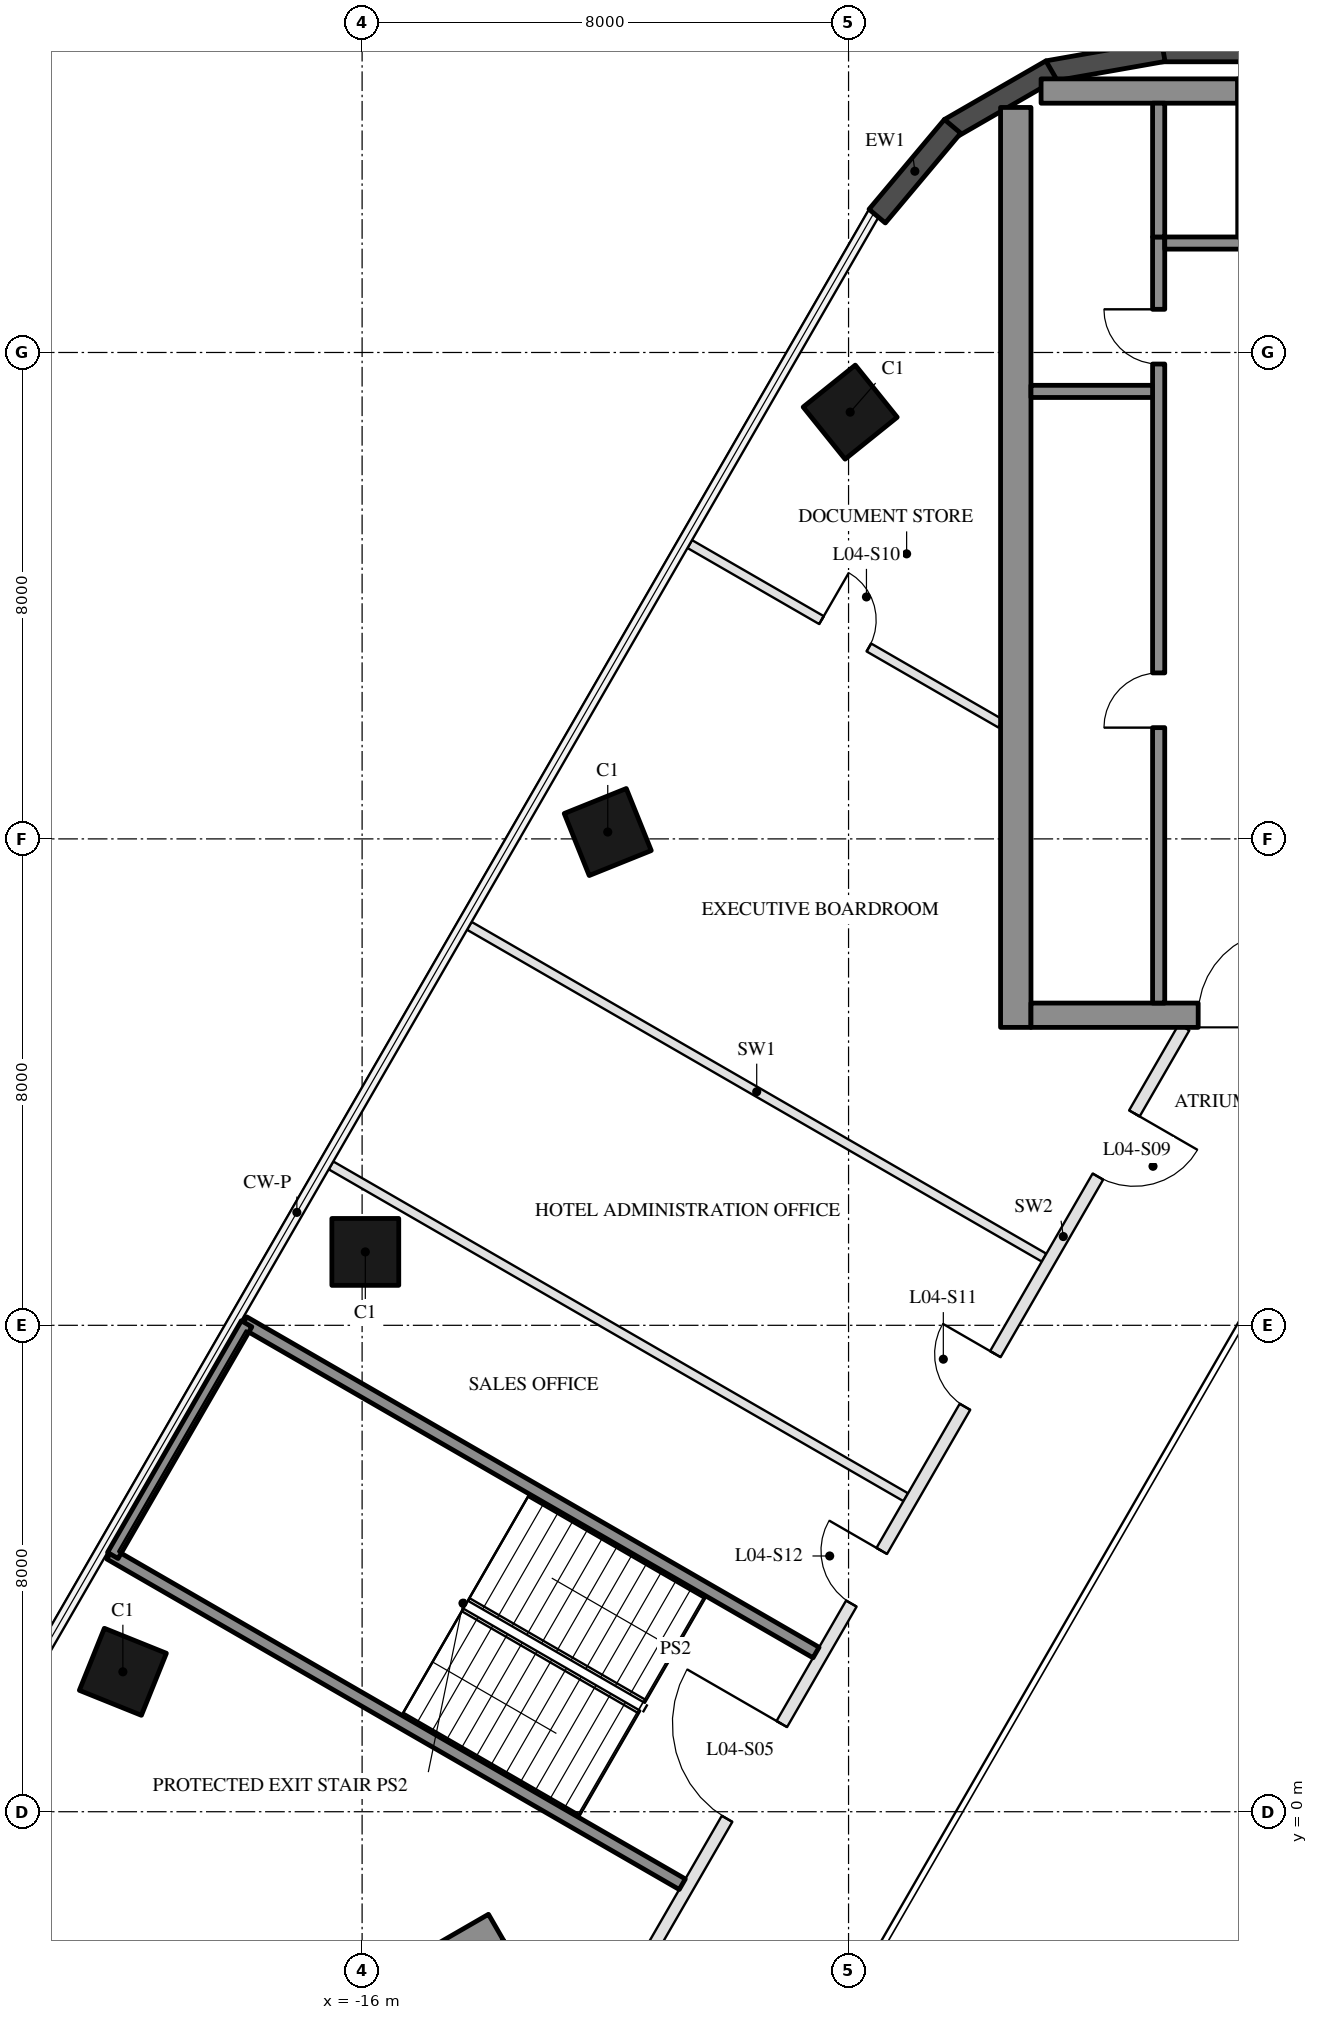
"""IFC4 building model, lengths in metres.
Left out: names, types, materials, properties, quantities, classifications, styles, units other than length and angle.
Written with IfcOpenShell. Run it as: python <this file> out.ifc"""

import sys

from ifc_helpers import new_model, si_unit, direction, frame, frame_2d, origin, origin_2d, place, context, subcontext, project, spatial, rectangle, hollow_rectangle, extrude, boolean, halfspace, element, fill, save


model = new_model("IFC4")
c1 = context("Model", 3, precision=1e-05, world=origin(), true_north=direction((0.0, 1.0)))
c2 = subcontext(c1, "Body", "Model", "MODEL_VIEW")
j1 = project(units=[si_unit("LENGTHUNIT", "METRE"), si_unit("PLANEANGLEUNIT", "RADIAN")], contexts=[c1])
p1 = place(None, origin())
s1 = spatial("IfcSite", under=j1, at=p1, CompositionType="ELEMENT")
p2 = place(p1, origin())
s2 = spatial("IfcBuilding", under=s1, at=p2, CompositionType="ELEMENT")
p3 = place(p2, frame((0.0, 0.0, 28.5)))
s3 = spatial("IfcBuildingStorey", under=s2, at=p3, CompositionType="ELEMENT", Elevation=28.5)
p4 = place(p3, frame((-7.973, 23.019, 0.0), z_axis=(0.014257598898, -0.036701119596, 0.999224573704), x_axis=(0.499479314293, 0.865974198785, 0.024679984425)))
e1 = element("IfcColumn", 1, at=p4, inside=s3, PredefinedType="COLUMN", context=c2, shape_type="SweptSolid", body=[
    boolean("DIFFERENCE", boolean("DIFFERENCE", extrude(hollow_rectangle(XDim=1.1, YDim=1.1, WallThickness=0.05, at=origin_2d()), origin(), (0.0, 0.0, 1.0), 4.503), halfspace(frame((0.0, 0.0, 0.013), z_axis=(0.0, 0.0, 1.0), x_axis=(1.0, 0.0, 0.0)), True)), halfspace(frame((0.0, 0.0, 4.491), z_axis=(0.0, 0.0, 1.0), x_axis=(1.0, 0.0, 0.0)), False)),
])
p5 = place(p3, frame((-11.96, 16.113, 0.0), z_axis=(0.020388124423, -0.026081616616, 0.999451886614), x_axis=(0.501064231638, 0.865321827993, 0.012360006954)))
e2 = element("IfcColumn", 2, at=p5, inside=s3, PredefinedType="COLUMN", context=c2, shape_type="SweptSolid", body=[
    boolean("DIFFERENCE", boolean("DIFFERENCE", extrude(hollow_rectangle(XDim=1.1, YDim=1.1, WallThickness=0.05, at=origin_2d()), origin(), (0.0, 0.0, 1.0), 4.502), halfspace(frame((0.0, 0.0, 0.011), z_axis=(0.0, 0.0, 1.0), x_axis=(1.0, 0.0, 0.0)), True)), halfspace(frame((0.0, 0.0, 4.492), z_axis=(0.0, 0.0, 1.0), x_axis=(1.0, 0.0, 0.0)), False)),
])
p6 = place(p3, frame((-15.947, 9.207, 0.0), z_axis=(0.026625850327, -0.015400695505, 0.999526829391), x_axis=(0.500507531384, 0.865732182021, 6.442154e-06)))
e3 = element("IfcColumn", 3, at=p6, inside=s3, PredefinedType="COLUMN", context=c2, shape_type="SweptSolid", body=[
    boolean("DIFFERENCE", boolean("DIFFERENCE", extrude(hollow_rectangle(XDim=1.1, YDim=1.1, WallThickness=0.05, at=origin_2d()), origin(), (0.0, 0.0, 1.0), 4.502), halfspace(frame((0.0, 0.0, 0.01), z_axis=(0.0, 0.0, 1.0), x_axis=(1.0, 0.0, 0.0)), True)), halfspace(frame((0.0, 0.0, 4.492), z_axis=(0.0, 0.0, 1.0), x_axis=(1.0, 0.0, 0.0)), False)),
])
p7 = place(p3, frame((-19.934, 2.301, 0.0), z_axis=(0.032751169552, -0.004609022205, 0.999452909249), x_axis=(-0.499064961058, -0.866476451895, 0.012358112959)))
e4 = element("IfcColumn", 4, at=p7, inside=s3, PredefinedType="COLUMN", context=c2, shape_type="SweptSolid", body=[
    boolean("DIFFERENCE", boolean("DIFFERENCE", extrude(hollow_rectangle(XDim=1.1, YDim=1.1, WallThickness=0.05, at=origin_2d()), origin(), (0.0, 0.0, 1.0), 4.502), halfspace(frame((0.0, 0.0, 0.011), z_axis=(0.0, 0.0, 1.0), x_axis=(1.0, 0.0, 0.0)), True)), halfspace(frame((0.0, 0.0, 4.492), z_axis=(0.0, 0.0, 1.0), x_axis=(1.0, 0.0, 0.0)), False)),
])
p8 = place(p3, frame((0.0, 27.2, 0.0), z_axis=(0.0, 0.0, 1.0), x_axis=(1.0, 0.0, 0.0)))
e5 = element("IfcColumn", 5, at=p8, inside=s3, PredefinedType="COLUMN", context=c2, shape_type="SweptSolid", body=[
    extrude(hollow_rectangle(XDim=3.2, YDim=2.6, WallThickness=0.08, at=origin_2d()), origin(), (0.0, 0.0, 1.0), 4.5),
])
p9 = place(p3, frame((2.856, 28.956, 0.0), z_axis=(0.0, 0.0, 1.0), x_axis=(-1.0, 0.0, 0.0)))
e6 = element("IfcWall", 6, at=p9, inside=s3, PredefinedType="SOLIDWALL", context=c2, shape_type="SweptSolid", body=[
    extrude(rectangle(XDim=5.711, YDim=0.35, at=frame_2d((2.856, 0.0))), origin(), (0.0, 0.0, 1.0), 4.2),
])
p10 = place(p3, frame((-2.825, 28.958, 0.0), z_axis=(0.0, 0.0, 1.0), x_axis=(-0.98481795522, -0.173590308126, 0.0)))
e7 = element("IfcWall", 7, at=p10, inside=s3, PredefinedType="SOLIDWALL", context=c2, shape_type="SweptSolid", body=[
    extrude(rectangle(XDim=1.928, YDim=0.35, at=frame_2d((0.964, 0.0))), origin(), (0.0, 0.0, 1.0), 4.2),
])
for number, where, z_axis, x_axis in (
    (8, (-4.667, 28.645, 0.0), (0.0, 0.0, 1.0), (-0.866, -0.5, 0.0)),
    (9, (-6.29, 27.72, 0.0), (0.0, 0.0, 1.0), (-0.643, -0.766, 0.0)),
):
    element("IfcWall", number, at=place(p3, frame(where, z_axis=z_axis, x_axis=x_axis)), inside=s3, PredefinedType="SOLIDWALL", context=c2, shape_type="SweptSolid", body=[
        extrude(rectangle(XDim=1.928, YDim=0.35, at=frame_2d((0.964, 0.0))), origin(), (0.0, 0.0, 1.0), 4.2),
    ])
p11 = place(p3, frame((-5.25, 12.9, 0.0), z_axis=(0.0, 0.0, 1.0), x_axis=(0.0, 1.0, 0.0)))
e10 = element("IfcWall", 10, at=p11, inside=s3, PredefinedType="SHEAR", context=c2, shape_type="SweptSolid", body=[
    extrude(rectangle(XDim=15.13, YDim=0.5, at=frame_2d((7.565, 0.0))), origin(), (0.0, 0.0, 1.0), 4.2),
])
p12 = place(p3, frame((5.0, 13.1, 0.0), z_axis=(0.0, 0.0, 1.0), x_axis=(-1.0, 0.0, 0.0)))
e11 = element("IfcWall", 11, at=p12, inside=s3, PredefinedType="SHEAR", context=c2, shape_type="SweptSolid", body=[
    extrude(rectangle(XDim=10.0, YDim=0.4, at=frame_2d((5.0, 0.0))), origin(), (0.0, 0.0, 1.0), 4.2),
])
p13 = place(p12, frame((3.55, 0.0, 0.0)))
e12 = element("IfcOpeningElement", 12, at=p13, cuts=e11, PredefinedType="OPENING", context=c2, shape_type="SweptSolid", body=[
    extrude(rectangle(XDim=1.1, YDim=2.1, at=frame_2d((0.55, 1.05))), frame((0.0, 0.21, 0.0), z_axis=(0.0, -1.0, 0.0), x_axis=(1.0, 0.0, 0.0)), (0.0, 0.0, 1.0), 0.42),
])
p14 = place(p12, frame((5.85, 0.0, 0.0)))
e13 = element("IfcOpeningElement", 13, at=p14, cuts=e11, PredefinedType="OPENING", context=c2, shape_type="SweptSolid", body=[
    extrude(rectangle(XDim=1.4, YDim=2.1, at=frame_2d((0.7, 1.05))), frame((0.0, 0.21, 0.0), z_axis=(0.0, -1.0, 0.0), x_axis=(1.0, 0.0, 0.0)), (0.0, 0.0, 1.0), 0.42),
])
p15 = place(p3, frame((-1.6, 28.3, 0.0), z_axis=(0.0, 0.0, 1.0), x_axis=(-1.0, 0.0, 0.0)))
e14 = element("IfcWall", 14, at=p15, inside=s3, PredefinedType="SHEAR", context=c2, shape_type="SweptSolid", body=[
    extrude(rectangle(XDim=3.234, YDim=0.4, at=frame_2d((1.617, 0.0))), origin(), (0.0, 0.0, 1.0), 4.2),
])
p16 = place(p3, frame((-2.9, 13.3, 0.0), z_axis=(0.0, 0.0, 1.0), x_axis=(0.0, 1.0, 0.0)))
e15 = element("IfcWall", 15, at=p16, inside=s3, PredefinedType="SHEAR", context=c2, shape_type="SweptSolid", body=[
    extrude(rectangle(XDim=12.6, YDim=0.2, at=frame_2d((6.3, 0.0))), origin(), (0.0, 0.0, 1.0), 4.2),
])
p17 = place(p16, frame((4.53, 0.0, 0.0)))
e16 = element("IfcOpeningElement", 16, at=p17, cuts=e15, PredefinedType="OPENING", context=c2, shape_type="SweptSolid", body=[
    extrude(rectangle(XDim=0.9, YDim=2.1, at=frame_2d((0.45, 1.05))), frame((0.0, 0.11, 0.0), z_axis=(0.0, -1.0, 0.0), x_axis=(1.0, 0.0, 0.0)), (0.0, 0.0, 1.0), 0.22),
])
p18 = place(p16, frame((10.51, 0.0, 0.0)))
e17 = element("IfcOpeningElement", 17, at=p18, cuts=e15, PredefinedType="OPENING", context=c2, shape_type="SweptSolid", body=[
    extrude(rectangle(XDim=0.9, YDim=2.1, at=frame_2d((0.45, 1.05))), frame((0.0, 0.11, 0.0), z_axis=(0.0, -1.0, 0.0), x_axis=(1.0, 0.0, 0.0)), (0.0, 0.0, 1.0), 0.22),
])
p19 = place(p3, frame((-0.4, 25.8, 0.0), z_axis=(0.0, 0.0, 1.0), x_axis=(-1.0, 0.0, 0.0)))
e18 = element("IfcWall", 18, at=p19, inside=s3, PredefinedType="SHEAR", context=c2, shape_type="SweptSolid", body=[
    extrude(rectangle(XDim=2.4, YDim=0.2, at=frame_2d((1.2, 0.0))), origin(), (0.0, 0.0, 1.0), 4.2),
])
p20 = place(p3, frame((-3.0, 23.36, 0.0), z_axis=(0.0, 0.0, 1.0), x_axis=(-1.0, 0.0, 0.0)))
e19 = element("IfcWall", 19, at=p20, inside=s3, PredefinedType="SHEAR", context=c2, shape_type="SweptSolid", body=[
    extrude(rectangle(XDim=2.0, YDim=0.2, at=frame_2d((1.0, 0.0))), origin(), (0.0, 0.0, 1.0), 4.2),
])
p21 = place(p3, frame((-2.9, 25.9, 0.0), z_axis=(0.0, 0.0, 1.0), x_axis=(0.0, 1.0, 0.0)))
e20 = element("IfcWall", 20, at=p21, inside=s3, PredefinedType="SHEAR", context=c2, shape_type="SweptSolid", body=[
    extrude(rectangle(XDim=2.2, YDim=0.2, at=frame_2d((1.1, 0.0))), origin(), (0.0, 0.0, 1.0), 4.2),
])
p22 = place(p3, frame((-13.797, -1.903, 0.0), z_axis=(0.0, 0.0, 1.0), x_axis=(-0.866025168306, -0.500000407861, 0.0)))
e21 = element("IfcWall", 21, at=p22, inside=s3, PredefinedType="SHEAR", context=c2, shape_type="SweptSolid", body=[
    extrude(rectangle(XDim=15.13, YDim=0.5, at=frame_2d((7.565, 0.0))), origin(), (0.0, 0.0, 1.0), 4.2),
])
p23 = place(p3, frame((-10.612, 20.849, 0.0), z_axis=(0.0, 0.0, 1.0), x_axis=(0.866007180818, -0.500031561776, 0.0)))
e22 = element("IfcWall", 22, at=p23, inside=s3, PredefinedType="PARTITIONING", context=c2, shape_type="SweptSolid", body=[
    extrude(rectangle(XDim=5.902, YDim=0.15, at=frame_2d((2.951, 0.0))), origin(), (0.0, 0.0, 1.0), 3.6),
])
p24 = place(p23, frame((2.501, 0.0, 0.0)))
e23 = element("IfcOpeningElement", 23, at=p24, cuts=e22, PredefinedType="OPENING", context=c2, shape_type="SweptSolid", body=[
    extrude(rectangle(XDim=0.9, YDim=2.1, at=frame_2d((0.45, 1.05))), frame((0.0, 0.085, 0.0), z_axis=(0.0, -1.0, 0.0), x_axis=(1.0, 0.0, 0.0)), (0.0, 0.0, 1.0), 0.17),
])
for number, where, z_axis, x_axis in (
    (24, (-14.237, 14.57, 0.0), (0.0, 0.0, 1.0), (0.866, -0.5, 0.0)),
    (25, (-16.511, 10.63, 0.0), (0.0, 0.0, 1.0), (0.866, -0.5, 0.0)),
):
    element("IfcWall", number, at=place(p3, frame(where, z_axis=z_axis, x_axis=x_axis)), inside=s3, PredefinedType="PARTITIONING", context=c2, shape_type="SweptSolid", body=[
        extrude(rectangle(XDim=10.915, YDim=0.15, at=frame_2d((5.457, 0.0))), origin(), (0.0, 0.0, 1.0), 3.6),
    ])
p25 = place(p3, frame((-17.948, 8.053, 0.0), z_axis=(0.0, 0.0, 1.0), x_axis=(0.86602026553, -0.500008899612, 0.0)))
e26 = element("IfcWall", 26, at=p25, inside=s3, PredefinedType="SOLIDWALL", context=c2, shape_type="SweptSolid", body=[
    extrude(rectangle(XDim=10.87, YDim=0.2, at=frame_2d((5.435, 0.0))), origin(), (0.0, 0.0, 1.0), 4.2),
])
p26 = place(p3, frame((-20.148, 4.242, 0.0), z_axis=(0.0, 0.0, 1.0), x_axis=(0.866025880615, -0.499999174104, 0.0)))
e27 = element("IfcWall", 27, at=p26, inside=s3, PredefinedType="SOLIDWALL", context=c2, shape_type="SweptSolid", body=[
    extrude(rectangle(XDim=10.87, YDim=0.2, at=frame_2d((5.435, 0.0))), origin(), (0.0, 0.0, 1.0), 4.2),
])
p27 = place(p3, frame((-2.482, 12.9, 0.0), z_axis=(0.0, 0.0, 1.0), x_axis=(-0.50000478328, -0.866022642139, 0.0)))
e28 = element("IfcWall", 28, at=p27, inside=s3, PredefinedType="PARTITIONING", context=c2, shape_type="SweptSolid", body=[
    extrude(rectangle(XDim=19.861, YDim=0.2, at=frame_2d((9.931, 0.0))), origin(), (0.0, 0.0, 1.0), 3.41),
])
p28 = place(p27, frame((13.23, 0.0, 0.0)))
e29 = element("IfcOpeningElement", 29, at=p28, cuts=e28, PredefinedType="OPENING", context=c2, shape_type="SweptSolid", body=[
    extrude(rectangle(XDim=1.8, YDim=2.1, at=frame_2d((0.9, 1.05))), frame((0.0, 0.11, 0.0), z_axis=(0.0, -1.0, 0.0), x_axis=(1.0, 0.0, 0.0)), (0.0, 0.0, 1.0), 0.22),
])
p29 = place(p27, frame((1.634, 0.0, 0.0)))
e30 = element("IfcOpeningElement", 30, at=p29, cuts=e28, PredefinedType="OPENING", context=c2, shape_type="SweptSolid", body=[
    extrude(rectangle(XDim=1.2, YDim=2.1, at=frame_2d((0.6, 1.05))), frame((0.0, 0.11, 0.0), z_axis=(0.0, -1.0, 0.0), x_axis=(1.0, 0.0, 0.0)), (0.0, 0.0, 1.0), 0.22),
])
p30 = place(p27, frame((6.206, 0.0, 0.0)))
e31 = element("IfcOpeningElement", 31, at=p30, cuts=e28, PredefinedType="OPENING", context=c2, shape_type="SweptSolid", body=[
    extrude(rectangle(XDim=1.0, YDim=2.1, at=frame_2d((0.5, 1.05))), frame((0.0, 0.11, 0.0), z_axis=(0.0, -1.0, 0.0), x_axis=(1.0, 0.0, 0.0)), (0.0, 0.0, 1.0), 0.22),
])
p31 = place(p27, frame((9.943, 0.0, 0.0)))
e32 = element("IfcOpeningElement", 32, at=p31, cuts=e28, PredefinedType="OPENING", context=c2, shape_type="SweptSolid", body=[
    extrude(rectangle(XDim=1.0, YDim=2.1, at=frame_2d((0.5, 1.05))), frame((0.0, 0.11, 0.0), z_axis=(0.0, -1.0, 0.0), x_axis=(1.0, 0.0, 0.0)), (0.0, 0.0, 1.0), 0.22),
])
p32 = place(p27, frame((17.59, 0.0, 0.0)))
e33 = element("IfcOpeningElement", 33, at=p32, cuts=e28, PredefinedType="OPENING", context=c2, shape_type="SweptSolid", body=[
    extrude(rectangle(XDim=1.0, YDim=2.1, at=frame_2d((0.5, 1.05))), frame((0.0, 0.11, 0.0), z_axis=(0.0, -1.0, 0.0), x_axis=(1.0, 0.0, 0.0)), (0.0, 0.0, 1.0), 0.22),
])
p33 = place(p3, frame((-17.9, 8.025, 0.0), z_axis=(0.0, 0.0, 1.0), x_axis=(-0.499988222896, -0.866032203192, 0.0)))
e34 = element("IfcWall", 34, at=p33, inside=s3, PredefinedType="SOLIDWALL", context=c2, shape_type="SweptSolid", body=[
    extrude(rectangle(XDim=4.4, YDim=0.2, at=frame_2d((2.2, 0.0))), origin(), (0.0, 0.0, 1.0), 4.2),
])
p34 = place(p17, origin())
e35 = element("IfcDoor", 35, at=p34, inside=s3, OperationType="SINGLE_SWING_LEFT", PredefinedType="DOOR", context=c2, shape_type="SweptSolid", body=[
    extrude(rectangle(XDim=0.9, YDim=2.1, at=frame_2d((0.45, 1.05))), frame((0.0, 0.025, 0.0), z_axis=(0.0, -1.0, 0.0), x_axis=(1.0, 0.0, 0.0)), (0.0, 0.0, 1.0), 0.05),
])
fill(e16, e35)
p35 = place(p18, origin())
e36 = element("IfcDoor", 36, at=p35, inside=s3, OperationType="SINGLE_SWING_RIGHT", PredefinedType="DOOR", context=c2, shape_type="SweptSolid", body=[
    extrude(rectangle(XDim=0.9, YDim=2.1, at=frame_2d((0.45, 1.05))), frame((0.0, 0.025, 0.0), z_axis=(0.0, -1.0, 0.0), x_axis=(1.0, 0.0, 0.0)), (0.0, 0.0, 1.0), 0.05),
])
fill(e17, e36)
p36 = place(p14, frame((1.4, 0.0, 0.0), z_axis=(0.0, 0.0, 1.0), x_axis=(-1.0, 0.0, 0.0)))
e37 = element("IfcDoor", 37, at=p36, inside=s3, OperationType="DOUBLE_DOOR_SINGLE_SWING", PredefinedType="DOOR", context=c2, shape_type="SweptSolid", body=[
    extrude(rectangle(XDim=1.4, YDim=2.1, at=frame_2d((0.7, 1.05))), frame((0.0, 0.025, 0.0), z_axis=(0.0, -1.0, 0.0), x_axis=(1.0, 0.0, 0.0)), (0.0, 0.0, 1.0), 0.05),
])
fill(e13, e37)
p37 = place(p28, frame((1.8, 0.0, 0.0), z_axis=(0.0, 0.0, 1.0), x_axis=(-1.0, 0.0, 0.0)))
e38 = element("IfcDoor", 38, at=p37, inside=s3, OperationType="DOUBLE_DOOR_SINGLE_SWING", PredefinedType="DOOR", context=c2, shape_type="SweptSolid", body=[
    extrude(rectangle(XDim=1.8, YDim=2.1, at=frame_2d((0.9, 1.05))), frame((0.0, 0.025, 0.0), z_axis=(0.0, -1.0, 0.0), x_axis=(1.0, 0.0, 0.0)), (0.0, 0.0, 1.0), 0.05),
])
fill(e29, e38)
p38 = place(p29, origin())
e39 = element("IfcDoor", 39, at=p38, inside=s3, OperationType="SINGLE_SWING_LEFT", PredefinedType="DOOR", context=c2, shape_type="SweptSolid", body=[
    extrude(rectangle(XDim=1.2, YDim=2.1, at=frame_2d((0.6, 1.05))), frame((0.0, 0.025, 0.0), z_axis=(0.0, -1.0, 0.0), x_axis=(1.0, 0.0, 0.0)), (0.0, 0.0, 1.0), 0.05),
])
fill(e30, e39)
p39 = place(p24, origin())
e40 = element("IfcDoor", 40, at=p39, inside=s3, OperationType="SINGLE_SWING_LEFT", PredefinedType="DOOR", context=c2, shape_type="SweptSolid", body=[
    extrude(rectangle(XDim=0.9, YDim=2.1, at=frame_2d((0.45, 1.05))), frame((0.0, 0.025, 0.0), z_axis=(0.0, -1.0, 0.0), x_axis=(1.0, 0.0, 0.0)), (0.0, 0.0, 1.0), 0.05),
])
fill(e23, e40)
p40 = place(p30, frame((1.0, 0.0, 0.0), z_axis=(0.0, 0.0, 1.0), x_axis=(-1.0, 0.0, 0.0)))
e41 = element("IfcDoor", 41, at=p40, inside=s3, OperationType="SINGLE_SWING_RIGHT", PredefinedType="DOOR", context=c2, shape_type="SweptSolid", body=[
    extrude(rectangle(XDim=1.0, YDim=2.1, at=frame_2d((0.5, 1.05))), frame((0.0, 0.025, 0.0), z_axis=(0.0, -1.0, 0.0), x_axis=(1.0, 0.0, 0.0)), (0.0, 0.0, 1.0), 0.05),
])
fill(e31, e41)
p41 = place(p31, frame((1.0, 0.0, 0.0), z_axis=(0.0, 0.0, 1.0), x_axis=(-1.0, 0.0, 0.0)))
e42 = element("IfcDoor", 42, at=p41, inside=s3, OperationType="SINGLE_SWING_RIGHT", PredefinedType="DOOR", context=c2, shape_type="SweptSolid", body=[
    extrude(rectangle(XDim=1.0, YDim=2.1, at=frame_2d((0.5, 1.05))), frame((0.0, 0.025, 0.0), z_axis=(0.0, -1.0, 0.0), x_axis=(1.0, 0.0, 0.0)), (0.0, 0.0, 1.0), 0.05),
])
fill(e32, e42)
save(model, sys.argv[1])
